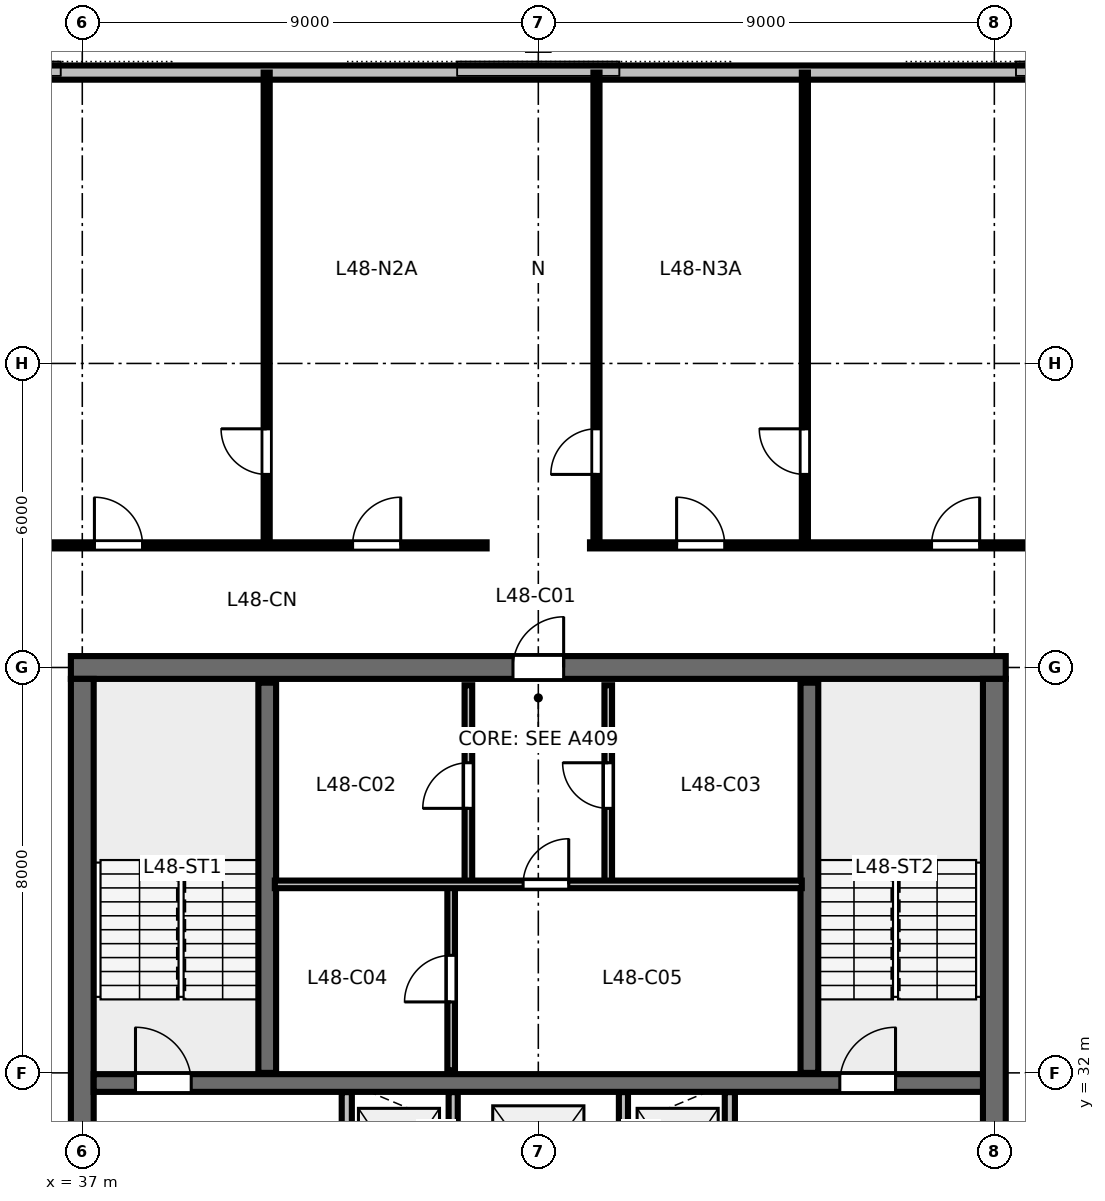
"""IFC4 building model, lengths in metres.
Left out: names, types, materials, properties, quantities, classifications, styles, units other than length and angle.
Written with IfcOpenShell. Run it as: python <this file> out.ifc"""

import sys

from ifc_helpers import new_model, si_unit, direction, frame, frame_2d, origin, origin_2d, place, context, subcontext, project, spatial, rectangle, i_section, extrude, element, fill, save


model = new_model("IFC4")
c1 = context("Model", 3, precision=1e-05, world=origin(), true_north=direction((0.0, 1.0)))
c2 = subcontext(c1, "Body", "Model", "MODEL_VIEW")
j1 = project(units=[si_unit("LENGTHUNIT", "METRE"), si_unit("PLANEANGLEUNIT", "RADIAN")], contexts=[c1])
p1 = place(None, origin())
s1 = spatial("IfcSite", under=j1, at=p1, CompositionType="ELEMENT")
p2 = place(p1, origin())
s2 = spatial("IfcBuilding", under=s1, at=p2, CompositionType="ELEMENT")
p3 = place(p2, frame((0.0, 0.0, 184.2)))
s3 = spatial("IfcBuildingStorey", under=s2, at=p3, CompositionType="ELEMENT", Elevation=184.2)
p4 = place(p3, frame((36.775, 40.0, 0.0), z_axis=(0.0, 0.0, 1.0), x_axis=(1.0, 0.0, 0.0)))
e1 = element("IfcWall", 1, at=p4, inside=s3, PredefinedType="SHEAR", context=c2, shape_type="SweptSolid", body=[
    extrude(rectangle(XDim=18.45, YDim=0.45, at=frame_2d((9.225, 0.0))), origin(), (0.0, 0.0, 1.0), 3.36),
])
p5 = place(p4, frame((8.725, 0.0, 0.0)))
e2 = element("IfcOpeningElement", 2, at=p5, cuts=e1, PredefinedType="OPENING", context=c2, shape_type="SweptSolid", body=[
    extrude(rectangle(XDim=1.0, YDim=2.15, at=frame_2d((0.5, 1.075))), frame((0.0, 0.235, 0.0), z_axis=(0.0, -1.0, 0.0), x_axis=(1.0, 0.0, 0.0)), (0.0, 0.0, 1.0), 0.47),
])
p6 = place(p3, frame((37.0, 24.225, 0.0), z_axis=(0.0, 0.0, 1.0), x_axis=(0.0, 1.0, 0.0)))
e3 = element("IfcWall", 3, at=p6, inside=s3, PredefinedType="SHEAR", context=c2, shape_type="SweptSolid", body=[
    extrude(rectangle(XDim=15.55, YDim=0.45, at=frame_2d((7.775, 0.0))), origin(), (0.0, 0.0, 1.0), 3.36),
])
p7 = place(p6, frame((5.3, 0.0, 0.0)))
e4 = element("IfcOpeningElement", 4, at=p7, cuts=e3, PredefinedType="OPENING", context=c2, shape_type="SweptSolid", body=[
    extrude(rectangle(XDim=1.15, YDim=2.15, at=frame_2d((0.575, 1.075))), frame((0.0, 0.235, 0.0), z_axis=(0.0, -1.0, 0.0), x_axis=(1.0, 0.0, 0.0)), (0.0, 0.0, 1.0), 0.47),
])
p8 = place(p3, frame((55.0, 24.225, 0.0), z_axis=(0.0, 0.0, 1.0), x_axis=(0.0, 1.0, 0.0)))
e5 = element("IfcWall", 5, at=p8, inside=s3, PredefinedType="SHEAR", context=c2, shape_type="SweptSolid", body=[
    extrude(rectangle(XDim=15.55, YDim=0.45, at=frame_2d((7.775, 0.0))), origin(), (0.0, 0.0, 1.0), 3.36),
])
p9 = place(p8, frame((5.3, 0.0, 0.0)))
e6 = element("IfcOpeningElement", 6, at=p9, cuts=e5, PredefinedType="OPENING", context=c2, shape_type="SweptSolid", body=[
    extrude(rectangle(XDim=1.15, YDim=2.15, at=frame_2d((0.575, 1.075))), frame((0.0, 0.235, 0.0), z_axis=(0.0, -1.0, 0.0), x_axis=(1.0, 0.0, 0.0)), (0.0, 0.0, 1.0), 0.47),
])
p10 = place(p3, frame((37.225, 31.8, 0.0), z_axis=(0.0, 0.0, 1.0), x_axis=(1.0, 0.0, 0.0)))
e7 = element("IfcWall", 7, at=p10, inside=s3, PredefinedType="SHEAR", context=c2, shape_type="SweptSolid", body=[
    extrude(rectangle(XDim=17.55, YDim=0.35, at=frame_2d((8.775, 0.0))), origin(), (0.0, 0.0, 1.0), 3.36),
])
p11 = place(p10, frame((0.825, 0.0, 0.0)))
e8 = element("IfcOpeningElement", 8, at=p11, cuts=e7, PredefinedType="OPENING", context=c2, shape_type="SweptSolid", body=[
    extrude(rectangle(XDim=1.1, YDim=2.15, at=frame_2d((0.55, 1.075))), frame((0.0, 0.185, 0.0), z_axis=(0.0, -1.0, 0.0), x_axis=(1.0, 0.0, 0.0)), (0.0, 0.0, 1.0), 0.37),
])
p12 = place(p10, frame((14.725, 0.0, 0.0)))
e9 = element("IfcOpeningElement", 9, at=p12, cuts=e7, PredefinedType="OPENING", context=c2, shape_type="SweptSolid", body=[
    extrude(rectangle(XDim=1.1, YDim=2.15, at=frame_2d((0.55, 1.075))), frame((0.0, 0.185, 0.0), z_axis=(0.0, -1.0, 0.0), x_axis=(1.0, 0.0, 0.0)), (0.0, 0.0, 1.0), 0.37),
])
p13 = place(p3, frame((46.0, 52.4, 0.0), z_axis=(0.0, -0.192822575522, 0.981233639033), x_axis=(1.0, 0.0, 0.0)))
e10 = element("IfcColumn", 10, at=p13, inside=s3, PredefinedType="COLUMN", context=c2, shape_type="SweptSolid", body=[
    extrude(i_section(OverallWidth=0.406, OverallDepth=0.425, WebThickness=0.033, FlangeThickness=0.052, FilletRadius=0.025, at=origin_2d()), origin(), (0.0, 0.0, 1.0), 3.422),
])
p14 = place(p3, frame((63.44, 51.74, 0.0), z_axis=(0.0, 0.0, 1.0), x_axis=(-1.0, 0.0, 0.0)))
e11 = element("IfcWall", 11, at=p14, inside=s3, PredefinedType="STANDARD", context=c2, shape_type="SweptSolid", body=[
    extrude(rectangle(XDim=34.88, YDim=0.28, at=frame_2d((17.44, 0.0))), origin(), (0.0, 0.0, 1.0), 2.817),
])
for number, where, z_axis, x_axis in (
    (12, (40.65, 32.0, 0.0), (0.0, 0.0, 1.0), (0.0, 1.0, 0.0)),
    (13, (51.35, 32.0, 0.0), (0.0, 0.0, 1.0), (0.0, 1.0, 0.0)),
):
    element("IfcWall", number, at=place(p3, frame(where, z_axis=z_axis, x_axis=x_axis)), inside=s3, PredefinedType="SHEAR", context=c2, shape_type="SweptSolid", body=[
        extrude(rectangle(XDim=7.7, YDim=0.35, at=frame_2d((3.85, 0.0))), origin(), (0.0, 0.0, 1.0), 3.6),
    ])
p15 = place(p3, frame((44.62, 35.72, 0.0), z_axis=(0.0, 0.0, 1.0), x_axis=(0.0, 1.0, 0.0)))
e14 = element("IfcWall", 14, at=p15, inside=s3, PredefinedType="PARTITIONING", context=c2, shape_type="SweptSolid", body=[
    extrude(rectangle(XDim=3.93, YDim=0.15, at=frame_2d((1.965, 0.0))), origin(), (0.0, 0.0, 1.0), 3.36),
])
p16 = place(p15, frame((1.5, 0.0, 0.0)))
e15 = element("IfcOpeningElement", 15, at=p16, cuts=e14, PredefinedType="OPENING", context=c2, shape_type="SweptSolid", body=[
    extrude(rectangle(XDim=0.9, YDim=2.15, at=frame_2d((0.45, 1.075))), frame((0.0, 0.085, 0.0), z_axis=(0.0, -1.0, 0.0), x_axis=(1.0, 0.0, 0.0)), (0.0, 0.0, 1.0), 0.17),
])
p17 = place(p3, frame((47.38, 35.72, 0.0), z_axis=(0.0, 0.0, 1.0), x_axis=(0.0, 1.0, 0.0)))
e16 = element("IfcWall", 16, at=p17, inside=s3, PredefinedType="PARTITIONING", context=c2, shape_type="SweptSolid", body=[
    extrude(rectangle(XDim=3.93, YDim=0.15, at=frame_2d((1.965, 0.0))), origin(), (0.0, 0.0, 1.0), 3.36),
])
p18 = place(p17, frame((1.5, 0.0, 0.0)))
e17 = element("IfcOpeningElement", 17, at=p18, cuts=e16, PredefinedType="OPENING", context=c2, shape_type="SweptSolid", body=[
    extrude(rectangle(XDim=0.9, YDim=2.15, at=frame_2d((0.45, 1.075))), frame((0.0, 0.085, 0.0), z_axis=(0.0, -1.0, 0.0), x_axis=(1.0, 0.0, 0.0)), (0.0, 0.0, 1.0), 0.17),
])
p19 = place(p3, frame((44.28, 32.05, 0.0), z_axis=(0.0, 0.0, 1.0), x_axis=(0.0, 1.0, 0.0)))
e18 = element("IfcWall", 18, at=p19, inside=s3, PredefinedType="PARTITIONING", context=c2, shape_type="SweptSolid", body=[
    extrude(rectangle(XDim=3.67, YDim=0.15, at=frame_2d((1.835, 0.0))), origin(), (0.0, 0.0, 1.0), 3.36),
])
p20 = place(p19, frame((1.35, 0.0, 0.0)))
e19 = element("IfcOpeningElement", 19, at=p20, cuts=e18, PredefinedType="OPENING", context=c2, shape_type="SweptSolid", body=[
    extrude(rectangle(XDim=0.92, YDim=2.15, at=frame_2d((0.46, 1.075))), frame((0.0, 0.085, 0.0), z_axis=(0.0, -1.0, 0.0), x_axis=(1.0, 0.0, 0.0)), (0.0, 0.0, 1.0), 0.17),
])
p21 = place(p3, frame((40.8, 35.72, 0.0), z_axis=(0.0, 0.0, 1.0), x_axis=(1.0, 0.0, 0.0)))
e20 = element("IfcWall", 20, at=p21, inside=s3, PredefinedType="PARTITIONING", context=c2, shape_type="SweptSolid", body=[
    extrude(rectangle(XDim=10.4, YDim=0.15, at=frame_2d((5.2, 0.0))), origin(), (0.0, 0.0, 1.0), 3.36),
])
p22 = place(p21, frame((4.9, 0.0, 0.0)))
e21 = element("IfcOpeningElement", 21, at=p22, cuts=e20, PredefinedType="OPENING", context=c2, shape_type="SweptSolid", body=[
    extrude(rectangle(XDim=0.9, YDim=2.15, at=frame_2d((0.45, 1.075))), frame((0.0, 0.085, 0.0), z_axis=(0.0, -1.0, 0.0), x_axis=(1.0, 0.0, 0.0)), (0.0, 0.0, 1.0), 0.17),
])
p23 = place(p3, frame((42.22, 28.58, 0.0), z_axis=(0.0, 0.0, 1.0), x_axis=(0.0, 1.0, 0.0)))
e22 = element("IfcWall", 22, at=p23, inside=s3, PredefinedType="PARTITIONING", context=c2, shape_type="SweptSolid", body=[
    extrude(rectangle(XDim=3.04, YDim=0.2, at=frame_2d((1.52, 0.0))), origin(), (0.0, 0.0, 1.0), 3.36),
])
p24 = place(p23, frame((0.95, 0.0, 0.0)))
e23 = element("IfcOpeningElement", 23, at=p24, cuts=e22, PredefinedType="OPENING", context=c2, shape_type="SweptSolid", body=[
    extrude(rectangle(XDim=1.05, YDim=2.15, at=frame_2d((0.525, 1.075))), frame((0.0, 0.11, 0.0), z_axis=(0.0, -1.0, 0.0), x_axis=(1.0, 0.0, 0.0)), (0.0, 0.0, 1.0), 0.22),
])
p25 = place(p3, frame((49.78, 28.58, 0.0), z_axis=(0.0, 0.0, 1.0), x_axis=(0.0, 1.0, 0.0)))
e24 = element("IfcWall", 24, at=p25, inside=s3, PredefinedType="PARTITIONING", context=c2, shape_type="SweptSolid", body=[
    extrude(rectangle(XDim=3.04, YDim=0.2, at=frame_2d((1.52, 0.0))), origin(), (0.0, 0.0, 1.0), 3.36),
])
p26 = place(p25, frame((0.95, 0.0, 0.0)))
e25 = element("IfcOpeningElement", 25, at=p26, cuts=e24, PredefinedType="OPENING", context=c2, shape_type="SweptSolid", body=[
    extrude(rectangle(XDim=1.05, YDim=2.15, at=frame_2d((0.525, 1.075))), frame((0.0, 0.11, 0.0), z_axis=(0.0, -1.0, 0.0), x_axis=(1.0, 0.0, 0.0)), (0.0, 0.0, 1.0), 0.22),
])
for number, where, z_axis, x_axis in (
    (26, (44.32, 28.58, 0.0), (0.0, 0.0, 1.0), (0.0, 1.0, 0.0)),
    (27, (47.68, 28.58, 0.0), (0.0, 0.0, 1.0), (0.0, 1.0, 0.0)),
):
    element("IfcWall", number, at=place(p3, frame(where, z_axis=z_axis, x_axis=x_axis)), inside=s3, PredefinedType="PARTITIONING", context=c2, shape_type="SweptSolid", body=[
        extrude(rectangle(XDim=3.04, YDim=0.18, at=frame_2d((1.52, 0.0))), origin(), (0.0, 0.0, 1.0), 3.36),
    ])
p27 = place(p3, frame((40.639, 42.41, 0.0), z_axis=(0.0, 0.0, 1.0), x_axis=(0.0, 1.0, 0.0)))
e28 = element("IfcWall", 28, at=p27, inside=s3, PredefinedType="PARTITIONING", context=c2, shape_type="SweptSolid", body=[
    extrude(rectangle(XDim=9.33, YDim=0.12, at=frame_2d((4.665, 0.0))), origin(), (0.0, 0.0, 1.0), 2.64),
])
p28 = place(p27, frame((1.4, 0.0, 0.0)))
e29 = element("IfcOpeningElement", 29, at=p28, cuts=e28, PredefinedType="OPENING", context=c2, shape_type="SweptSolid", body=[
    extrude(rectangle(XDim=0.9, YDim=2.15, at=frame_2d((0.45, 1.075))), frame((0.0, 0.07, 0.0), z_axis=(0.0, -1.0, 0.0), x_axis=(1.0, 0.0, 0.0)), (0.0, 0.0, 1.0), 0.14),
])
p29 = place(p3, frame((47.148, 42.41, 0.0), z_axis=(0.0, 0.0, 1.0), x_axis=(0.0, 1.0, 0.0)))
e30 = element("IfcWall", 30, at=p29, inside=s3, PredefinedType="PARTITIONING", context=c2, shape_type="SweptSolid", body=[
    extrude(rectangle(XDim=9.33, YDim=0.12, at=frame_2d((4.665, 0.0))), origin(), (0.0, 0.0, 1.0), 2.64),
])
p30 = place(p29, frame((1.4, 0.0, 0.0)))
e31 = element("IfcOpeningElement", 31, at=p30, cuts=e30, PredefinedType="OPENING", context=c2, shape_type="SweptSolid", body=[
    extrude(rectangle(XDim=0.9, YDim=2.15, at=frame_2d((0.45, 1.075))), frame((0.0, 0.07, 0.0), z_axis=(0.0, -1.0, 0.0), x_axis=(1.0, 0.0, 0.0)), (0.0, 0.0, 1.0), 0.14),
])
p31 = place(p3, frame((51.261, 42.41, 0.0), z_axis=(0.0, 0.0, 1.0), x_axis=(0.0, 1.0, 0.0)))
e32 = element("IfcWall", 32, at=p31, inside=s3, PredefinedType="PARTITIONING", context=c2, shape_type="SweptSolid", body=[
    extrude(rectangle(XDim=9.33, YDim=0.12, at=frame_2d((4.665, 0.0))), origin(), (0.0, 0.0, 1.0), 2.64),
])
p32 = place(p31, frame((1.4, 0.0, 0.0)))
e33 = element("IfcOpeningElement", 33, at=p32, cuts=e32, PredefinedType="OPENING", context=c2, shape_type="SweptSolid", body=[
    extrude(rectangle(XDim=0.9, YDim=2.15, at=frame_2d((0.45, 1.075))), frame((0.0, 0.07, 0.0), z_axis=(0.0, -1.0, 0.0), x_axis=(1.0, 0.0, 0.0)), (0.0, 0.0, 1.0), 0.14),
])
p33 = place(p3, frame((34.65, 42.41, 0.0), z_axis=(0.0, 0.0, 1.0), x_axis=(1.0, 0.0, 0.0)))
e34 = element("IfcWall", 34, at=p33, inside=s3, PredefinedType="PARTITIONING", context=c2, shape_type="SweptSolid", body=[
    extrude(rectangle(XDim=10.33, YDim=0.12, at=frame_2d((5.165, 0.0))), origin(), (0.0, 0.0, 1.0), 2.64),
])
p34 = place(p33, frame((2.59, 0.0, 0.0)))
e35 = element("IfcOpeningElement", 35, at=p34, cuts=e34, PredefinedType="OPENING", context=c2, shape_type="SweptSolid", body=[
    extrude(rectangle(XDim=0.95, YDim=2.15, at=frame_2d((0.475, 1.075))), frame((0.0, 0.07, 0.0), z_axis=(0.0, -1.0, 0.0), x_axis=(1.0, 0.0, 0.0)), (0.0, 0.0, 1.0), 0.14),
])
p35 = place(p33, frame((7.685, 0.0, 0.0)))
e36 = element("IfcOpeningElement", 36, at=p35, cuts=e34, PredefinedType="OPENING", context=c2, shape_type="SweptSolid", body=[
    extrude(rectangle(XDim=0.95, YDim=2.15, at=frame_2d((0.475, 1.075))), frame((0.0, 0.07, 0.0), z_axis=(0.0, -1.0, 0.0), x_axis=(1.0, 0.0, 0.0)), (0.0, 0.0, 1.0), 0.14),
])
p36 = place(p3, frame((47.02, 42.41, 0.0), z_axis=(0.0, 0.0, 1.0), x_axis=(1.0, 0.0, 0.0)))
e37 = element("IfcWall", 37, at=p36, inside=s3, PredefinedType="PARTITIONING", context=c2, shape_type="SweptSolid", body=[
    extrude(rectangle(XDim=10.33, YDim=0.12, at=frame_2d((5.165, 0.0))), origin(), (0.0, 0.0, 1.0), 2.64),
])
p37 = place(p36, frame((1.709, 0.0, 0.0)))
e38 = element("IfcOpeningElement", 38, at=p37, cuts=e37, PredefinedType="OPENING", context=c2, shape_type="SweptSolid", body=[
    extrude(rectangle(XDim=0.95, YDim=2.15, at=frame_2d((0.475, 1.075))), frame((0.0, 0.07, 0.0), z_axis=(0.0, -1.0, 0.0), x_axis=(1.0, 0.0, 0.0)), (0.0, 0.0, 1.0), 0.14),
])
p38 = place(p36, frame((6.74, 0.0, 0.0)))
e39 = element("IfcOpeningElement", 39, at=p38, cuts=e37, PredefinedType="OPENING", context=c2, shape_type="SweptSolid", body=[
    extrude(rectangle(XDim=0.95, YDim=2.15, at=frame_2d((0.475, 1.075))), frame((0.0, 0.07, 0.0), z_axis=(0.0, -1.0, 0.0), x_axis=(1.0, 0.0, 0.0)), (0.0, 0.0, 1.0), 0.14),
])
p39 = place(p11, origin())
e40 = element("IfcDoor", 40, at=p39, inside=s3, OperationType="SINGLE_SWING_LEFT", PredefinedType="DOOR", context=c2, shape_type="SweptSolid", body=[
    extrude(rectangle(XDim=1.1, YDim=2.15, at=frame_2d((0.55, 1.075))), frame((0.0, 0.025, 0.0), z_axis=(0.0, -1.0, 0.0), x_axis=(1.0, 0.0, 0.0)), (0.0, 0.0, 1.0), 0.05),
])
fill(e8, e40)
p40 = place(p12, origin())
e41 = element("IfcDoor", 41, at=p40, inside=s3, OperationType="SINGLE_SWING_RIGHT", PredefinedType="DOOR", context=c2, shape_type="SweptSolid", body=[
    extrude(rectangle(XDim=1.1, YDim=2.15, at=frame_2d((0.55, 1.075))), frame((0.0, 0.025, 0.0), z_axis=(0.0, -1.0, 0.0), x_axis=(1.0, 0.0, 0.0)), (0.0, 0.0, 1.0), 0.05),
])
fill(e9, e41)
p41 = place(p5, origin())
e42 = element("IfcDoor", 42, at=p41, inside=s3, OperationType="SINGLE_SWING_RIGHT", PredefinedType="DOOR", context=c2, shape_type="SweptSolid", body=[
    extrude(rectangle(XDim=1.0, YDim=2.15, at=frame_2d((0.5, 1.075))), frame((0.0, 0.025, 0.0), z_axis=(0.0, -1.0, 0.0), x_axis=(1.0, 0.0, 0.0)), (0.0, 0.0, 1.0), 0.05),
])
fill(e2, e42)
p42 = place(p16, origin())
e43 = element("IfcDoor", 43, at=p42, inside=s3, OperationType="SINGLE_SWING_LEFT", PredefinedType="DOOR", context=c2, shape_type="SweptSolid", body=[
    extrude(rectangle(XDim=0.9, YDim=2.15, at=frame_2d((0.45, 1.075))), frame((0.0, 0.025, 0.0), z_axis=(0.0, -1.0, 0.0), x_axis=(1.0, 0.0, 0.0)), (0.0, 0.0, 1.0), 0.05),
])
fill(e15, e43)
p43 = place(p18, origin())
e44 = element("IfcDoor", 44, at=p43, inside=s3, OperationType="SINGLE_SWING_RIGHT", PredefinedType="DOOR", context=c2, shape_type="SweptSolid", body=[
    extrude(rectangle(XDim=0.9, YDim=2.15, at=frame_2d((0.45, 1.075))), frame((0.0, 0.025, 0.0), z_axis=(0.0, -1.0, 0.0), x_axis=(1.0, 0.0, 0.0)), (0.0, 0.0, 1.0), 0.05),
])
fill(e17, e44)
p44 = place(p20, origin())
e45 = element("IfcDoor", 45, at=p44, inside=s3, OperationType="SINGLE_SWING_LEFT", PredefinedType="DOOR", context=c2, shape_type="SweptSolid", body=[
    extrude(rectangle(XDim=0.92, YDim=2.15, at=frame_2d((0.46, 1.075))), frame((0.0, 0.025, 0.0), z_axis=(0.0, -1.0, 0.0), x_axis=(1.0, 0.0, 0.0)), (0.0, 0.0, 1.0), 0.05),
])
fill(e19, e45)
p45 = place(p22, origin())
e46 = element("IfcDoor", 46, at=p45, inside=s3, OperationType="SINGLE_SWING_RIGHT", PredefinedType="DOOR", context=c2, shape_type="SweptSolid", body=[
    extrude(rectangle(XDim=0.9, YDim=2.15, at=frame_2d((0.45, 1.075))), frame((0.0, 0.025, 0.0), z_axis=(0.0, -1.0, 0.0), x_axis=(1.0, 0.0, 0.0)), (0.0, 0.0, 1.0), 0.05),
])
fill(e21, e46)
p46 = place(p28, origin())
e47 = element("IfcDoor", 47, at=p46, inside=s3, OperationType="SINGLE_SWING_RIGHT", PredefinedType="DOOR", context=c2, shape_type="SweptSolid", body=[
    extrude(rectangle(XDim=0.9, YDim=2.15, at=frame_2d((0.45, 1.075))), frame((0.0, 0.025, 0.0), z_axis=(0.0, -1.0, 0.0), x_axis=(1.0, 0.0, 0.0)), (0.0, 0.0, 1.0), 0.05),
])
fill(e29, e47)
p47 = place(p30, origin())
e48 = element("IfcDoor", 48, at=p47, inside=s3, OperationType="SINGLE_SWING_LEFT", PredefinedType="DOOR", context=c2, shape_type="SweptSolid", body=[
    extrude(rectangle(XDim=0.9, YDim=2.15, at=frame_2d((0.45, 1.075))), frame((0.0, 0.025, 0.0), z_axis=(0.0, -1.0, 0.0), x_axis=(1.0, 0.0, 0.0)), (0.0, 0.0, 1.0), 0.05),
])
fill(e31, e48)
p48 = place(p32, origin())
e49 = element("IfcDoor", 49, at=p48, inside=s3, OperationType="SINGLE_SWING_RIGHT", PredefinedType="DOOR", context=c2, shape_type="SweptSolid", body=[
    extrude(rectangle(XDim=0.9, YDim=2.15, at=frame_2d((0.45, 1.075))), frame((0.0, 0.025, 0.0), z_axis=(0.0, -1.0, 0.0), x_axis=(1.0, 0.0, 0.0)), (0.0, 0.0, 1.0), 0.05),
])
fill(e33, e49)
p49 = place(p34, origin())
e50 = element("IfcDoor", 50, at=p49, inside=s3, OperationType="SINGLE_SWING_LEFT", PredefinedType="DOOR", context=c2, shape_type="SweptSolid", body=[
    extrude(rectangle(XDim=0.95, YDim=2.15, at=frame_2d((0.475, 1.075))), frame((0.0, 0.025, 0.0), z_axis=(0.0, -1.0, 0.0), x_axis=(1.0, 0.0, 0.0)), (0.0, 0.0, 1.0), 0.05),
])
fill(e35, e50)
p50 = place(p35, origin())
e51 = element("IfcDoor", 51, at=p50, inside=s3, OperationType="SINGLE_SWING_RIGHT", PredefinedType="DOOR", context=c2, shape_type="SweptSolid", body=[
    extrude(rectangle(XDim=0.95, YDim=2.15, at=frame_2d((0.475, 1.075))), frame((0.0, 0.025, 0.0), z_axis=(0.0, -1.0, 0.0), x_axis=(1.0, 0.0, 0.0)), (0.0, 0.0, 1.0), 0.05),
])
fill(e36, e51)
p51 = place(p37, origin())
e52 = element("IfcDoor", 52, at=p51, inside=s3, OperationType="SINGLE_SWING_LEFT", PredefinedType="DOOR", context=c2, shape_type="SweptSolid", body=[
    extrude(rectangle(XDim=0.95, YDim=2.15, at=frame_2d((0.475, 1.075))), frame((0.0, 0.025, 0.0), z_axis=(0.0, -1.0, 0.0), x_axis=(1.0, 0.0, 0.0)), (0.0, 0.0, 1.0), 0.05),
])
fill(e38, e52)
p52 = place(p38, origin())
e53 = element("IfcDoor", 53, at=p52, inside=s3, OperationType="SINGLE_SWING_RIGHT", PredefinedType="DOOR", context=c2, shape_type="SweptSolid", body=[
    extrude(rectangle(XDim=0.95, YDim=2.15, at=frame_2d((0.475, 1.075))), frame((0.0, 0.025, 0.0), z_axis=(0.0, -1.0, 0.0), x_axis=(1.0, 0.0, 0.0)), (0.0, 0.0, 1.0), 0.05),
])
fill(e39, e53)
save(model, sys.argv[1])
